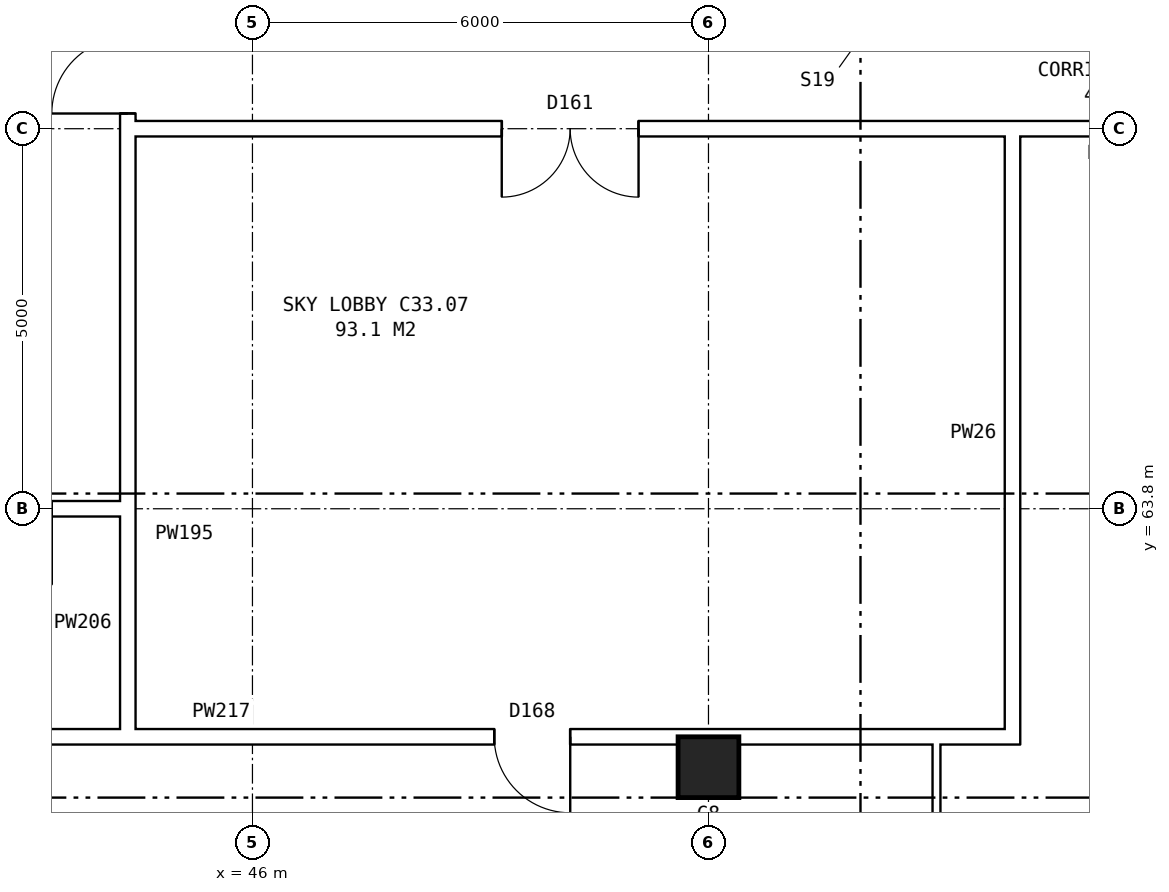
"""IFC4 building model, lengths in metres.
Left out: names, types, materials, properties, quantities, classifications, styles, units other than length and angle.
Written with IfcOpenShell. Run it as: python <this file> out.ifc"""

import sys

from ifc_helpers import new_model, si_unit, direction, frame, frame_2d, origin, origin_2d, place, context, subcontext, project, spatial, rectangle, extrude, element, fill, save


model = new_model("IFC4")
c1 = context("Model", 3, precision=1e-05, world=origin(), true_north=direction((0.0, 1.0)))
c2 = subcontext(c1, "Body", "Model", "MODEL_VIEW")
j1 = project(units=[si_unit("LENGTHUNIT", "METRE"), si_unit("PLANEANGLEUNIT", "RADIAN")], contexts=[c1])
p1 = place(None, origin())
s1 = spatial("IfcSite", under=j1, at=p1, CompositionType="ELEMENT")
p2 = place(p1, origin())
s2 = spatial("IfcBuilding", under=s1, at=p2, CompositionType="ELEMENT")
p3 = place(p2, frame((0.0, 0.0, 119.5)))
s3 = spatial("IfcBuildingStorey", under=s2, at=p3, CompositionType="ELEMENT", Elevation=119.5)
p4 = place(p3, frame((52.0, 60.4, 0.0), z_axis=(0.0, 0.0, 1.0), x_axis=(1.0, 0.0, 0.0)))
e1 = element("IfcColumn", 1, at=p4, inside=s3, PredefinedType="COLUMN", context=c2, shape_type="SweptSolid", body=[
    extrude(rectangle(XDim=0.8, YDim=0.8, at=origin_2d()), origin(), (0.0, 0.0, 1.0), 3.6),
])
p5 = place(p3, frame((44.36, 63.9, 0.0), z_axis=(0.0, 0.0, 1.0), x_axis=(0.0, 1.0, 0.0)))
e2 = element("IfcWall", 2, at=p5, inside=s3, PredefinedType="PARTITIONING", context=c2, shape_type="SweptSolid", body=[
    extrude(rectangle(XDim=12.2, YDim=0.2, at=frame_2d((6.1, 0.0))), origin(), (0.0, 0.0, 1.0), 3.6),
])
p6 = place(p5, frame((5.1, 0.0, 0.0)))
e3 = element("IfcOpeningElement", 3, at=p6, cuts=e2, PredefinedType="OPENING", context=c2, shape_type="SweptSolid", body=[
    extrude(rectangle(XDim=2.0, YDim=2.1, at=frame_2d((1.0, 1.05))), frame((0.0, 0.11, 0.0), z_axis=(0.0, -1.0, 0.0), x_axis=(1.0, 0.0, 0.0)), (0.0, 0.0, 1.0), 0.22),
])
p7 = place(p3, frame((26.99, 60.8, 0.0), z_axis=(0.0, 0.0, 1.0), x_axis=(1.0, 0.0, 0.0)))
e4 = element("IfcWall", 4, at=p7, inside=s3, PredefinedType="PARTITIONING", context=c2, shape_type="SweptSolid", body=[
    extrude(rectangle(XDim=29.11, YDim=0.2, at=frame_2d((14.555, 0.0))), origin(), (0.0, 0.0, 1.0), 3.6),
])
p8 = place(p7, frame((3.065, 0.0, 0.0)))
e5 = element("IfcOpeningElement", 5, at=p8, cuts=e4, PredefinedType="OPENING", context=c2, shape_type="SweptSolid", body=[
    extrude(rectangle(XDim=1.0, YDim=2.1, at=frame_2d((0.5, 1.05))), frame((0.0, 0.11, 0.0), z_axis=(0.0, -1.0, 0.0), x_axis=(1.0, 0.0, 0.0)), (0.0, 0.0, 1.0), 0.22),
])
p9 = place(p7, frame((9.51, 0.0, 0.0)))
e6 = element("IfcOpeningElement", 6, at=p9, cuts=e4, PredefinedType="OPENING", context=c2, shape_type="SweptSolid", body=[
    extrude(rectangle(XDim=1.0, YDim=2.1, at=frame_2d((0.5, 1.05))), frame((0.0, 0.11, 0.0), z_axis=(0.0, -1.0, 0.0), x_axis=(1.0, 0.0, 0.0)), (0.0, 0.0, 1.0), 0.22),
])
p10 = place(p7, frame((14.01, 0.0, 0.0)))
e7 = element("IfcOpeningElement", 7, at=p10, cuts=e4, PredefinedType="OPENING", context=c2, shape_type="SweptSolid", body=[
    extrude(rectangle(XDim=1.0, YDim=2.1, at=frame_2d((0.5, 1.05))), frame((0.0, 0.11, 0.0), z_axis=(0.0, -1.0, 0.0), x_axis=(1.0, 0.0, 0.0)), (0.0, 0.0, 1.0), 0.22),
])
p11 = place(p7, frame((22.191, 0.0, 0.0)))
e8 = element("IfcOpeningElement", 8, at=p11, cuts=e4, PredefinedType="OPENING", context=c2, shape_type="SweptSolid", body=[
    extrude(rectangle(XDim=1.0, YDim=2.1, at=frame_2d((0.5, 1.05))), frame((0.0, 0.11, 0.0), z_axis=(0.0, -1.0, 0.0), x_axis=(1.0, 0.0, 0.0)), (0.0, 0.0, 1.0), 0.22),
])
p12 = place(p3, frame((41.36, 63.8, 0.0), z_axis=(0.0, 0.0, 1.0), x_axis=(1.0, 0.0, 0.0)))
e9 = element("IfcWall", 9, at=p12, inside=s3, PredefinedType="PARTITIONING", context=c2, shape_type="SweptSolid", body=[
    extrude(rectangle(XDim=3.1, YDim=0.2, at=frame_2d((1.55, 0.0))), origin(), (0.0, 0.0, 1.0), 3.6),
])
p13 = place(p12, frame((1.0, 0.0, 0.0)))
e10 = element("IfcOpeningElement", 10, at=p13, cuts=e9, PredefinedType="OPENING", context=c2, shape_type="SweptSolid", body=[
    extrude(rectangle(XDim=1.0, YDim=2.1, at=frame_2d((0.5, 1.05))), frame((0.0, 0.11, 0.0), z_axis=(0.0, -1.0, 0.0), x_axis=(1.0, 0.0, 0.0)), (0.0, 0.0, 1.0), 0.22),
])
p14 = place(p3, frame((44.36, 68.8, 0.0), z_axis=(0.0, 0.0, 1.0), x_axis=(1.0, 0.0, 0.0)))
e11 = element("IfcWall", 11, at=p14, inside=s3, PredefinedType="PARTITIONING", context=c2, shape_type="SweptSolid", body=[
    extrude(rectangle(XDim=19.28, YDim=0.2, at=frame_2d((9.64, 0.0))), origin(), (0.0, 0.0, 1.0), 3.6),
])
p15 = place(p14, frame((4.92, 0.0, 0.0)))
e12 = element("IfcOpeningElement", 12, at=p15, cuts=e11, PredefinedType="OPENING", context=c2, shape_type="SweptSolid", body=[
    extrude(rectangle(XDim=1.8, YDim=2.1, at=frame_2d((0.9, 1.05))), frame((0.0, 0.11, 0.0), z_axis=(0.0, -1.0, 0.0), x_axis=(1.0, 0.0, 0.0)), (0.0, 0.0, 1.0), 0.22),
])
p16 = place(p3, frame((44.36, 60.7, 0.0), z_axis=(0.0, 0.0, 1.0), x_axis=(0.0, 1.0, 0.0)))
e13 = element("IfcWall", 13, at=p16, inside=s3, PredefinedType="PARTITIONING", context=c2, shape_type="SweptSolid", body=[
    extrude(rectangle(XDim=3.2, YDim=0.2, at=frame_2d((1.6, 0.0))), origin(), (0.0, 0.0, 1.0), 3.6),
])
p17 = place(p3, frame((55.0, 54.24, 0.0), z_axis=(0.0, 0.0, 1.0), x_axis=(0.0, 1.0, 0.0)))
e14 = element("IfcWall", 14, at=p17, inside=s3, PredefinedType="PARTITIONING", context=c2, shape_type="SweptSolid", body=[
    extrude(rectangle(XDim=6.66, YDim=0.1, at=frame_2d((3.33, 0.0))), origin(), (0.0, 0.0, 1.0), 3.6),
])
p18 = place(p3, frame((56.0, 60.7, 0.0), z_axis=(0.0, 0.0, 1.0), x_axis=(0.0, 1.0, 0.0)))
e15 = element("IfcWall", 15, at=p18, inside=s3, PredefinedType="PARTITIONING", context=c2, shape_type="SweptSolid", body=[
    extrude(rectangle(XDim=8.2, YDim=0.2, at=frame_2d((4.1, 0.0))), origin(), (0.0, 0.0, 1.0), 3.6),
])
p19 = place(p6, origin())
e16 = element("IfcDoor", 16, at=p19, inside=s3, OperationType="DOUBLE_DOOR_SINGLE_SWING", PredefinedType="DOOR", context=c2, shape_type="SweptSolid", body=[
    extrude(rectangle(XDim=2.0, YDim=2.1, at=frame_2d((1.0, 1.05))), frame((0.0, 0.025, 0.0), z_axis=(0.0, -1.0, 0.0), x_axis=(1.0, 0.0, 0.0)), (0.0, 0.0, 1.0), 0.05),
])
fill(e3, e16)
p20 = place(p11, frame((1.0, 0.0, 0.0), z_axis=(0.0, 0.0, 1.0), x_axis=(-1.0, 0.0, 0.0)))
e17 = element("IfcDoor", 17, at=p20, inside=s3, OperationType="SINGLE_SWING_LEFT", PredefinedType="DOOR", context=c2, shape_type="SweptSolid", body=[
    extrude(rectangle(XDim=1.0, YDim=2.1, at=frame_2d((0.5, 1.05))), frame((0.0, 0.025, 0.0), z_axis=(0.0, -1.0, 0.0), x_axis=(1.0, 0.0, 0.0)), (0.0, 0.0, 1.0), 0.05),
])
fill(e8, e17)
p21 = place(p15, frame((1.8, 0.0, 0.0), z_axis=(0.0, 0.0, 1.0), x_axis=(-1.0, 0.0, 0.0)))
e18 = element("IfcDoor", 18, at=p21, inside=s3, OperationType="DOUBLE_DOOR_SINGLE_SWING", PredefinedType="DOOR", context=c2, shape_type="SweptSolid", body=[
    extrude(rectangle(XDim=1.8, YDim=2.1, at=frame_2d((0.9, 1.05))), frame((0.0, 0.025, 0.0), z_axis=(0.0, -1.0, 0.0), x_axis=(1.0, 0.0, 0.0)), (0.0, 0.0, 1.0), 0.05),
])
fill(e12, e18)
save(model, sys.argv[1])
